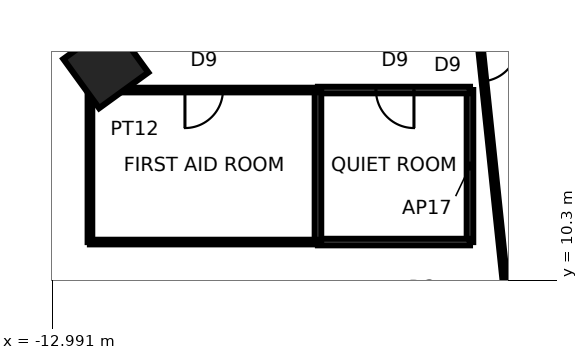
"""IFC4 building model, lengths in metres.
Left out: names, types, materials, properties, quantities, classifications, styles, units other than length and angle.
Written with IfcOpenShell. Run it as: python <this file> out.ifc"""

import sys

from ifc_helpers import new_model, si_unit, direction, frame, frame_2d, origin, origin_2d, place, context, subcontext, project, spatial, rectangle, extrude, element, fill, save


model = new_model("IFC4")
c1 = context("Model", 3, precision=1e-05, world=origin(), true_north=direction((0.0, 1.0)))
c2 = subcontext(c1, "Body", "Model", "MODEL_VIEW")
j1 = project(units=[si_unit("LENGTHUNIT", "METRE"), si_unit("PLANEANGLEUNIT", "RADIAN")], contexts=[c1])
p1 = place(None, origin())
s1 = spatial("IfcSite", under=j1, at=p1, CompositionType="ELEMENT")
p2 = place(p1, origin())
s2 = spatial("IfcBuilding", under=s1, at=p2, CompositionType="ELEMENT")
p3 = place(p2, frame((0.0, 0.0, 162.6)))
s3 = spatial("IfcBuildingStorey", under=s2, at=p3, CompositionType="ELEMENT", Elevation=162.6)
p4 = place(p3, frame((-11.581, 15.94, 0.0), z_axis=(0.0, 0.0, 1.0), x_axis=(-0.587785252292, 0.809016994375, 0.0)))
e1 = element("IfcColumn", 1, at=p4, inside=s3, PredefinedType="COLUMN", context=c2, shape_type="SweptSolid", body=[
    extrude(rectangle(XDim=1.6, YDim=1.6, at=origin_2d()), origin(), (0.0, 0.0, 1.0), 3.9),
])
p5 = place(p3, frame((-2.229, 21.212, 0.0), z_axis=(0.0, 0.0, 1.0), x_axis=(0.104525070238, -0.994522251984, 0.0)))
e2 = element("IfcWall", 2, at=p5, inside=s3, PredefinedType="PARTITIONING", context=c2, shape_type="SweptSolid", body=[
    extrude(rectangle(XDim=11.777, YDim=0.12, at=frame_2d((5.888, 0.0))), origin(), (0.0, 0.0, 1.0), 3.7),
])
p6 = place(p5, frame((4.712, 0.0, 0.0)))
e3 = element("IfcOpeningElement", 3, at=p6, cuts=e2, PredefinedType="OPENING", context=c2, shape_type="SweptSolid", body=[
    extrude(rectangle(XDim=1.0, YDim=2.4, at=frame_2d((0.5, 1.2))), frame((0.0, 0.07, 0.0), z_axis=(0.0, -1.0, 0.0), x_axis=(1.0, 0.0, 0.0)), (0.0, 0.0, 1.0), 0.14),
])
p7 = place(p3, frame((-2.0, 15.3, 0.0), z_axis=(0.0, 0.0, 1.0), x_axis=(0.0, -1.0, 0.0)))
e4 = element("IfcWall", 4, at=p7, inside=s3, PredefinedType="PARTITIONING", context=c2, shape_type="SweptSolid", body=[
    extrude(rectangle(XDim=4.0, YDim=0.17, at=frame_2d((2.0, 0.0))), origin(), (0.0, 0.0, 1.0), 3.7),
])
p8 = place(p3, frame((-6.0, 15.3, 0.0), z_axis=(0.0, 0.0, 1.0), x_axis=(1.0, 0.0, 0.0)))
e5 = element("IfcWall", 5, at=p8, inside=s3, PredefinedType="PARTITIONING", context=c2, shape_type="SweptSolid", body=[
    extrude(rectangle(XDim=4.0, YDim=0.17, at=frame_2d((2.0, 0.0))), origin(), (0.0, 0.0, 1.0), 3.7),
])
p9 = place(p8, frame((1.526, 0.0, 0.0)))
e6 = element("IfcOpeningElement", 6, at=p9, cuts=e5, PredefinedType="OPENING", context=c2, shape_type="SweptSolid", body=[
    extrude(rectangle(XDim=1.0, YDim=2.4, at=frame_2d((0.5, 1.2))), frame((0.0, 0.095, 0.0), z_axis=(0.0, -1.0, 0.0), x_axis=(1.0, 0.0, 0.0)), (0.0, 0.0, 1.0), 0.19),
])
for number, where, z_axis, x_axis in (
    (7, (-2.0, 11.3, 0.0), (0.0, 0.0, 1.0), (-1.0, 0.0, 0.0)),
    (8, (-6.0, 15.3, 0.0), (0.0, 0.0, 1.0), (0.0, -1.0, 0.0)),
):
    element("IfcWall", number, at=place(p3, frame(where, z_axis=z_axis, x_axis=x_axis)), inside=s3, PredefinedType="PARTITIONING", context=c2, shape_type="SweptSolid", body=[
        extrude(rectangle(XDim=4.0, YDim=0.17, at=frame_2d((2.0, 0.0))), origin(), (0.0, 0.0, 1.0), 3.7),
    ])
p10 = place(p3, frame((-12.0, 15.3, 0.0), z_axis=(0.0, 0.0, 1.0), x_axis=(1.0, 0.0, 0.0)))
e9 = element("IfcWall", 9, at=p10, inside=s3, PredefinedType="PARTITIONING", context=c2, shape_type="SweptSolid", body=[
    extrude(rectangle(XDim=6.0, YDim=0.12, at=frame_2d((3.0, 0.0))), origin(), (0.0, 0.0, 1.0), 3.7),
])
p11 = place(p10, frame((2.5, 0.0, 0.0)))
e10 = element("IfcOpeningElement", 10, at=p11, cuts=e9, PredefinedType="OPENING", context=c2, shape_type="SweptSolid", body=[
    extrude(rectangle(XDim=1.0, YDim=2.4, at=frame_2d((0.5, 1.2))), frame((0.0, 0.07, 0.0), z_axis=(0.0, -1.0, 0.0), x_axis=(1.0, 0.0, 0.0)), (0.0, 0.0, 1.0), 0.14),
])
p12 = place(p3, frame((-6.0, 11.3, 0.0), z_axis=(0.0, 0.0, 1.0), x_axis=(-1.0, 0.0, 0.0)))
e11 = element("IfcWall", 11, at=p12, inside=s3, PredefinedType="PARTITIONING", context=c2, shape_type="SweptSolid", body=[
    extrude(rectangle(XDim=6.0, YDim=0.12, at=frame_2d((3.0, 0.0))), origin(), (0.0, 0.0, 1.0), 3.7),
])
p13 = place(p3, frame((-12.0, 11.3, 0.0), z_axis=(0.0, 0.0, 1.0), x_axis=(0.0, 1.0, 0.0)))
e12 = element("IfcWall", 12, at=p13, inside=s3, PredefinedType="PARTITIONING", context=c2, shape_type="SweptSolid", body=[
    extrude(rectangle(XDim=4.0, YDim=0.12, at=frame_2d((2.0, 0.0))), origin(), (0.0, 0.0, 1.0), 3.7),
])
p14 = place(p11, frame((1.0, 0.0, 0.0), z_axis=(0.0, 0.0, 1.0), x_axis=(-1.0, 0.0, 0.0)))
e13 = element("IfcDoor", 13, at=p14, inside=s3, OperationType="SINGLE_SWING_RIGHT", PredefinedType="DOOR", context=c2, shape_type="SweptSolid", body=[
    extrude(rectangle(XDim=1.0, YDim=2.4, at=frame_2d((0.5, 1.2))), frame((0.0, 0.025, 0.0), z_axis=(0.0, -1.0, 0.0), x_axis=(1.0, 0.0, 0.0)), (0.0, 0.0, 1.0), 0.05),
])
fill(e10, e13)
p15 = place(p9, frame((1.0, 0.0, 0.0), z_axis=(0.0, 0.0, 1.0), x_axis=(-1.0, 0.0, 0.0)))
e14 = element("IfcDoor", 14, at=p15, inside=s3, OperationType="SINGLE_SWING_LEFT", PredefinedType="DOOR", context=c2, shape_type="SweptSolid", body=[
    extrude(rectangle(XDim=1.0, YDim=2.4, at=frame_2d((0.5, 1.2))), frame((0.0, 0.025, 0.0), z_axis=(0.0, -1.0, 0.0), x_axis=(1.0, 0.0, 0.0)), (0.0, 0.0, 1.0), 0.05),
])
fill(e6, e14)
p16 = place(p6, origin())
e15 = element("IfcDoor", 15, at=p16, inside=s3, OperationType="SINGLE_SWING_LEFT", PredefinedType="DOOR", context=c2, shape_type="SweptSolid", body=[
    extrude(rectangle(XDim=1.0, YDim=2.4, at=frame_2d((0.5, 1.2))), frame((0.0, 0.025, 0.0), z_axis=(0.0, -1.0, 0.0), x_axis=(1.0, 0.0, 0.0)), (0.0, 0.0, 1.0), 0.05),
])
fill(e3, e15)
save(model, sys.argv[1])
